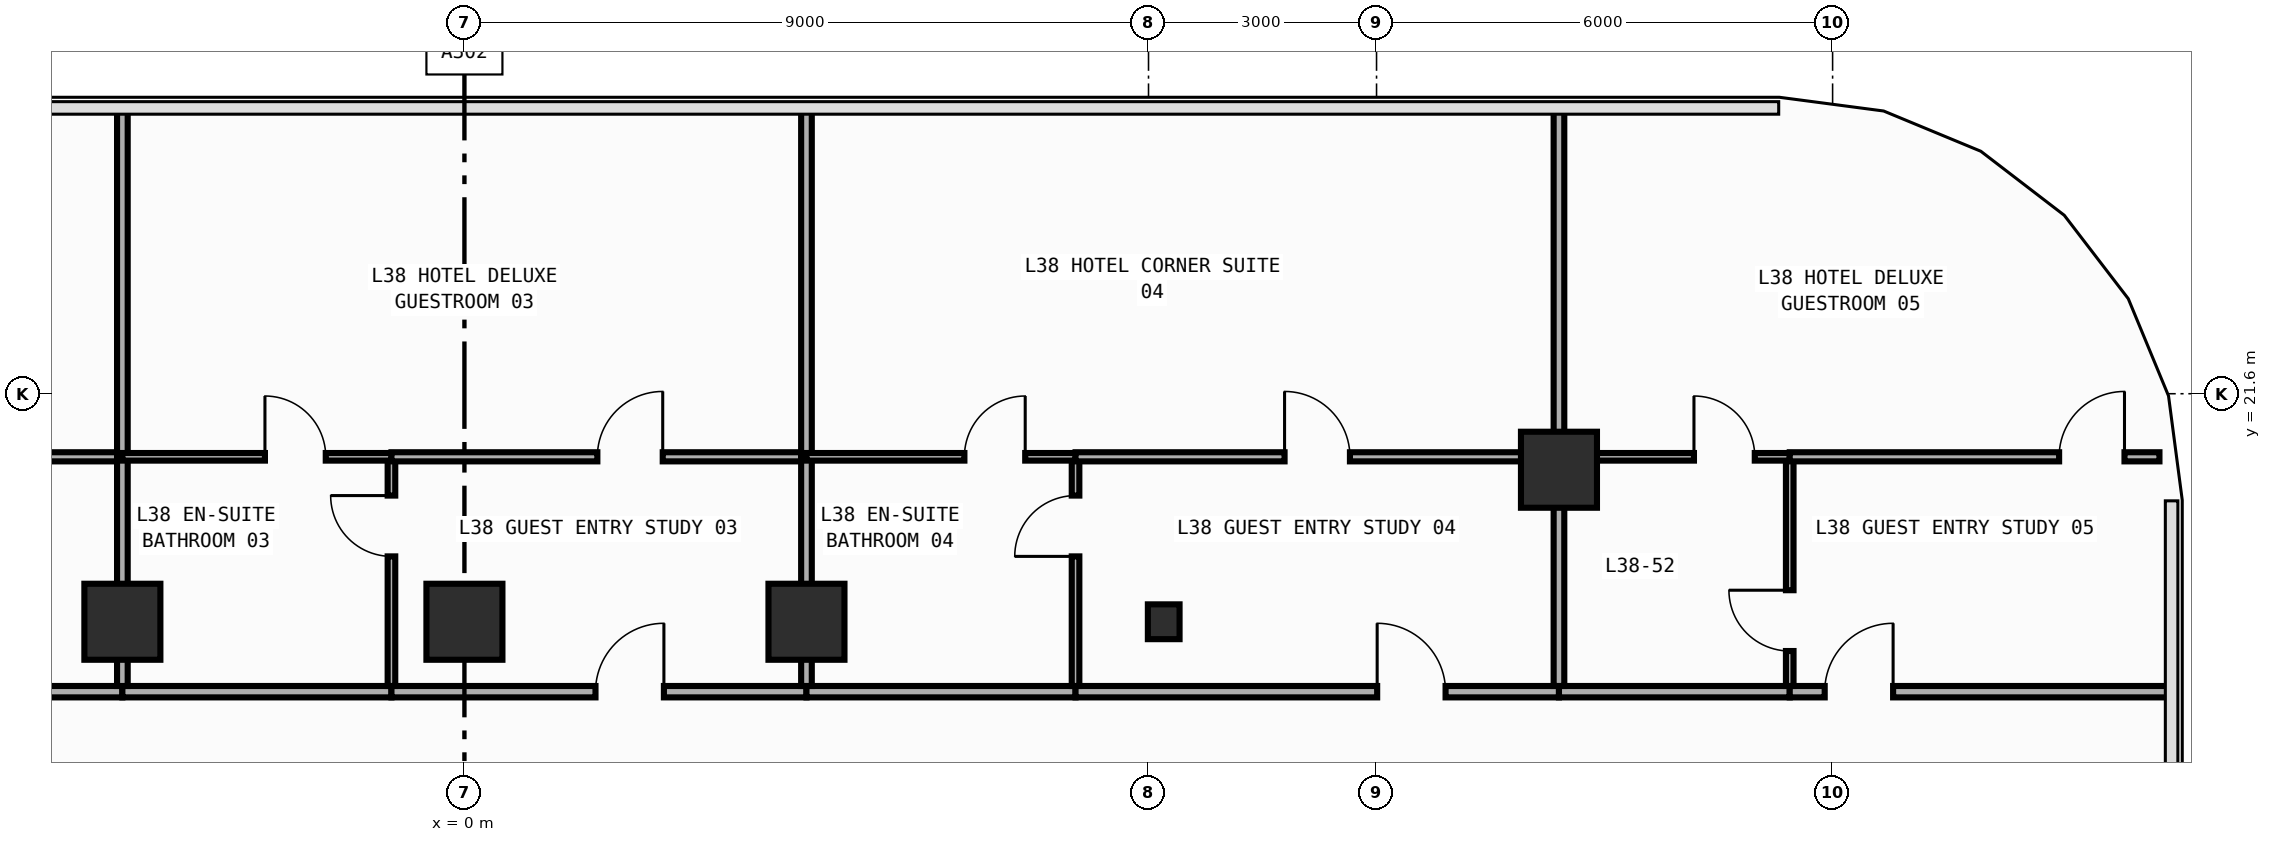
"""IFC4 building model, lengths in metres.
Left out: names, types, materials, properties, quantities, classifications, styles, units other than length and angle.
Written with IfcOpenShell. Run it as: python <this file> out.ifc"""

import sys

from ifc_helpers import new_model, si_unit, direction, frame, frame_2d, origin, origin_2d, place, context, subcontext, project, spatial, rectangle, i_section, extrude, element, fill, save


model = new_model("IFC4")
c1 = context("Model", 3, precision=1e-05, world=origin(), true_north=direction((0.0, 1.0)))
c2 = subcontext(c1, "Body", "Model", "MODEL_VIEW")
j1 = project(units=[si_unit("LENGTHUNIT", "METRE"), si_unit("PLANEANGLEUNIT", "RADIAN")], contexts=[c1])
p1 = place(None, origin())
s1 = spatial("IfcSite", under=j1, at=p1, CompositionType="ELEMENT")
p2 = place(p1, origin())
s2 = spatial("IfcBuilding", under=s1, at=p2, CompositionType="ELEMENT")
p3 = place(p2, frame((0.0, 0.0, 168.8)))
s3 = spatial("IfcBuildingStorey", under=s2, at=p3, CompositionType="ELEMENT", Elevation=168.8)
p4 = place(p3, frame((9.2, 18.6, 0.0), z_axis=(0.0, 0.0, 1.0), x_axis=(1.0, 0.0, 0.0)))
e1 = element("IfcColumn", 1, at=p4, inside=s3, PredefinedType="COLUMN", context=c2, shape_type="SweptSolid", body=[
    extrude(i_section(OverallWidth=0.417, OverallDepth=0.458, WebThickness=0.03, FlangeThickness=0.05, FilletRadius=0.022, at=origin_2d()), origin(), (0.0, 0.0, 1.0), 3.8),
])
for number, where, z_axis, x_axis in (
    (2, (-4.5, 18.6, 0.0), (0.0, 0.0, 1.0), (1.0, 0.0, 0.0)),
    (3, (0.0, 18.6, 0.0), (0.0, 0.0, 1.0), (1.0, 0.0, 0.0)),
    (4, (4.5, 18.6, 0.0), (0.0, 0.0, 1.0), (1.0, 0.0, 0.0)),
    (5, (14.4, 20.6, 0.0), (0.0, 0.0, 1.0), (1.0, 0.0, 0.0)),
):
    element("IfcColumn", number, at=place(p3, frame(where, z_axis=z_axis, x_axis=x_axis)), inside=s3, PredefinedType="COLUMN", context=c2, shape_type="SweptSolid", body=[
        extrude(rectangle(XDim=1.0, YDim=1.0, at=origin_2d()), origin(), (0.0, 0.0, 1.0), 3.8),
    ])
p5 = place(p3, frame((-10.86, 17.68, 0.0), z_axis=(0.0, 0.0, 1.0), x_axis=(1.0, 0.0, 0.0)))
e6 = element("IfcWall", 6, at=p5, inside=s3, PredefinedType="PARTITIONING", context=c2, shape_type="SweptSolid", body=[
    extrude(rectangle(XDim=6.36, YDim=0.15, at=frame_2d((3.18, 0.0))), origin(), (0.0, 0.0, 1.0), 3.54),
])
p6 = place(p5, frame((3.349, 0.0, 0.0)))
e7 = element("IfcOpeningElement", 7, at=p6, cuts=e6, PredefinedType="OPENING", context=c2, shape_type="SweptSolid", body=[
    extrude(rectangle(XDim=0.9, YDim=2.15, at=frame_2d((0.45, 1.075))), frame((0.0, 0.085, 0.0), z_axis=(0.0, -1.0, 0.0), x_axis=(1.0, 0.0, 0.0)), (0.0, 0.0, 1.0), 0.17),
])
p7 = place(p3, frame((-4.5, 17.68, 0.0), z_axis=(0.0, 0.0, 1.0), x_axis=(1.0, 0.0, 0.0)))
e8 = element("IfcWall", 8, at=p7, inside=s3, PredefinedType="PARTITIONING", context=c2, shape_type="SweptSolid", body=[
    extrude(rectangle(XDim=3.54, YDim=0.15, at=frame_2d((1.77, 0.0))), origin(), (0.0, 0.0, 1.0), 3.54),
])
p8 = place(p3, frame((-0.96, 17.68, 0.0), z_axis=(0.0, 0.0, 1.0), x_axis=(1.0, 0.0, 0.0)))
e9 = element("IfcWall", 9, at=p8, inside=s3, PredefinedType="PARTITIONING", context=c2, shape_type="SweptSolid", body=[
    extrude(rectangle(XDim=5.46, YDim=0.15, at=frame_2d((2.73, 0.0))), origin(), (0.0, 0.0, 1.0), 3.54),
])
p9 = place(p8, frame((2.684, 0.0, 0.0)))
e10 = element("IfcOpeningElement", 10, at=p9, cuts=e9, PredefinedType="OPENING", context=c2, shape_type="SweptSolid", body=[
    extrude(rectangle(XDim=0.9, YDim=2.15, at=frame_2d((0.45, 1.075))), frame((0.0, 0.085, 0.0), z_axis=(0.0, -1.0, 0.0), x_axis=(1.0, 0.0, 0.0)), (0.0, 0.0, 1.0), 0.17),
])
p10 = place(p3, frame((4.5, 17.68, 0.0), z_axis=(0.0, 0.0, 1.0), x_axis=(1.0, 0.0, 0.0)))
e11 = element("IfcWall", 11, at=p10, inside=s3, PredefinedType="PARTITIONING", context=c2, shape_type="SweptSolid", body=[
    extrude(rectangle(XDim=3.54, YDim=0.15, at=frame_2d((1.77, 0.0))), origin(), (0.0, 0.0, 1.0), 3.54),
])
p11 = place(p3, frame((8.04, 17.68, 0.0), z_axis=(0.0, 0.0, 1.0), x_axis=(1.0, 0.0, 0.0)))
e12 = element("IfcWall", 12, at=p11, inside=s3, PredefinedType="PARTITIONING", context=c2, shape_type="SweptSolid", body=[
    extrude(rectangle(XDim=6.36, YDim=0.15, at=frame_2d((3.18, 0.0))), origin(), (0.0, 0.0, 1.0), 3.54),
])
p12 = place(p11, frame((3.968, 0.0, 0.0)))
e13 = element("IfcOpeningElement", 13, at=p12, cuts=e12, PredefinedType="OPENING", context=c2, shape_type="SweptSolid", body=[
    extrude(rectangle(XDim=0.9, YDim=2.15, at=frame_2d((0.45, 1.075))), frame((0.0, 0.085, 0.0), z_axis=(0.0, -1.0, 0.0), x_axis=(1.0, 0.0, 0.0)), (0.0, 0.0, 1.0), 0.17),
])
p13 = place(p3, frame((14.4, 17.68, 0.0), z_axis=(0.0, 0.0, 1.0), x_axis=(1.0, 0.0, 0.0)))
e14 = element("IfcWall", 14, at=p13, inside=s3, PredefinedType="PARTITIONING", context=c2, shape_type="SweptSolid", body=[
    extrude(rectangle(XDim=3.036, YDim=0.15, at=frame_2d((1.518, 0.0))), origin(), (0.0, 0.0, 1.0), 3.54),
])
p14 = place(p3, frame((17.436, 17.68, 0.0), z_axis=(0.0, 0.0, 1.0), x_axis=(1.0, 0.0, 0.0)))
e15 = element("IfcWall", 15, at=p14, inside=s3, PredefinedType="PARTITIONING", context=c2, shape_type="SweptSolid", body=[
    extrude(rectangle(XDim=5.019, YDim=0.15, at=frame_2d((2.51, 0.0))), origin(), (0.0, 0.0, 1.0), 3.54),
])
p15 = place(p14, frame((0.46, 0.0, 0.0)))
e16 = element("IfcOpeningElement", 16, at=p15, cuts=e15, PredefinedType="OPENING", context=c2, shape_type="SweptSolid", body=[
    extrude(rectangle(XDim=0.9, YDim=2.15, at=frame_2d((0.45, 1.075))), frame((0.0, 0.085, 0.0), z_axis=(0.0, -1.0, 0.0), x_axis=(1.0, 0.0, 0.0)), (0.0, 0.0, 1.0), 0.17),
])
p16 = place(p3, frame((-10.86, 20.77, 0.0), z_axis=(0.0, 0.0, 1.0), x_axis=(1.0, 0.0, 0.0)))
e17 = element("IfcWall", 17, at=p16, inside=s3, PredefinedType="PARTITIONING", context=c2, shape_type="SweptSolid", body=[
    extrude(rectangle(XDim=6.36, YDim=0.12, at=frame_2d((3.18, 0.0))), origin(), (0.0, 0.0, 1.0), 3.54),
])
p17 = place(p16, frame((3.375, 0.0, 0.0)))
e18 = element("IfcOpeningElement", 18, at=p17, cuts=e17, PredefinedType="OPENING", context=c2, shape_type="SweptSolid", body=[
    extrude(rectangle(XDim=0.86, YDim=2.15, at=frame_2d((0.43, 1.075))), frame((0.0, 0.07, 0.0), z_axis=(0.0, -1.0, 0.0), x_axis=(1.0, 0.0, 0.0)), (0.0, 0.0, 1.0), 0.14),
])
p18 = place(p3, frame((-4.5, 17.755, 0.0), z_axis=(0.0, 0.0, 1.0), x_axis=(0.0, 1.0, 0.0)))
e19 = element("IfcWall", 19, at=p18, inside=s3, PredefinedType="PARTITIONING", context=c2, shape_type="SweptSolid", body=[
    extrude(rectangle(XDim=3.015, YDim=0.14, at=frame_2d((1.508, 0.0))), origin(), (0.0, 0.0, 1.0), 3.54),
])
p19 = place(p3, frame((-4.5, 20.77, 0.0), z_axis=(0.0, 0.0, 1.0), x_axis=(0.0, 1.0, 0.0)))
e20 = element("IfcWall", 20, at=p19, inside=s3, PredefinedType="PARTITIONING", context=c2, shape_type="SweptSolid", body=[
    extrude(rectangle(XDim=4.585, YDim=0.14, at=frame_2d((2.292, 0.0))), origin(), (0.0, 0.0, 1.0), 3.54),
])
p20 = place(p3, frame((-0.96, 17.755, 0.0), z_axis=(0.0, 0.0, 1.0), x_axis=(0.0, 1.0, 0.0)))
e21 = element("IfcWall", 21, at=p20, inside=s3, PredefinedType="PARTITIONING", context=c2, shape_type="SweptSolid", body=[
    extrude(rectangle(XDim=2.965, YDim=0.1, at=frame_2d((1.482, 0.0))), origin(), (0.0, 0.0, 1.0), 3.54),
])
p21 = place(p20, frame((1.705, 0.0, 0.0)))
e22 = element("IfcOpeningElement", 22, at=p21, cuts=e21, PredefinedType="OPENING", context=c2, shape_type="SweptSolid", body=[
    extrude(rectangle(XDim=0.8, YDim=2.1, at=frame_2d((0.4, 1.05))), frame((0.0, 0.06, 0.0), z_axis=(0.0, -1.0, 0.0), x_axis=(1.0, 0.0, 0.0)), (0.0, 0.0, 1.0), 0.12),
])
p22 = place(p3, frame((-4.5, 20.77, 0.0), z_axis=(0.0, 0.0, 1.0), x_axis=(1.0, 0.0, 0.0)))
e23 = element("IfcWall", 23, at=p22, inside=s3, PredefinedType="PARTITIONING", context=c2, shape_type="SweptSolid", body=[
    extrude(rectangle(XDim=3.54, YDim=0.1, at=frame_2d((1.77, 0.0))), origin(), (0.0, 0.0, 1.0), 3.54),
])
p23 = place(p22, frame((1.875, 0.0, 0.0)))
e24 = element("IfcOpeningElement", 24, at=p23, cuts=e23, PredefinedType="OPENING", context=c2, shape_type="SweptSolid", body=[
    extrude(rectangle(XDim=0.8, YDim=2.1, at=frame_2d((0.4, 1.05))), frame((0.0, 0.06, 0.0), z_axis=(0.0, -1.0, 0.0), x_axis=(1.0, 0.0, 0.0)), (0.0, 0.0, 1.0), 0.12),
])
p24 = place(p3, frame((-0.96, 20.77, 0.0), z_axis=(0.0, 0.0, 1.0), x_axis=(1.0, 0.0, 0.0)))
e25 = element("IfcWall", 25, at=p24, inside=s3, PredefinedType="PARTITIONING", context=c2, shape_type="SweptSolid", body=[
    extrude(rectangle(XDim=5.46, YDim=0.12, at=frame_2d((2.73, 0.0))), origin(), (0.0, 0.0, 1.0), 3.54),
])
p25 = place(p24, frame((2.709, 0.0, 0.0)))
e26 = element("IfcOpeningElement", 26, at=p25, cuts=e25, PredefinedType="OPENING", context=c2, shape_type="SweptSolid", body=[
    extrude(rectangle(XDim=0.86, YDim=2.15, at=frame_2d((0.43, 1.075))), frame((0.0, 0.07, 0.0), z_axis=(0.0, -1.0, 0.0), x_axis=(1.0, 0.0, 0.0)), (0.0, 0.0, 1.0), 0.14),
])
p26 = place(p3, frame((4.5, 17.755, 0.0), z_axis=(0.0, 0.0, 1.0), x_axis=(0.0, 1.0, 0.0)))
e27 = element("IfcWall", 27, at=p26, inside=s3, PredefinedType="PARTITIONING", context=c2, shape_type="SweptSolid", body=[
    extrude(rectangle(XDim=3.015, YDim=0.14, at=frame_2d((1.508, 0.0))), origin(), (0.0, 0.0, 1.0), 3.54),
])
p27 = place(p3, frame((4.5, 20.77, 0.0), z_axis=(0.0, 0.0, 1.0), x_axis=(0.0, 1.0, 0.0)))
e28 = element("IfcWall", 28, at=p27, inside=s3, PredefinedType="PARTITIONING", context=c2, shape_type="SweptSolid", body=[
    extrude(rectangle(XDim=4.585, YDim=0.14, at=frame_2d((2.292, 0.0))), origin(), (0.0, 0.0, 1.0), 3.54),
])
p28 = place(p3, frame((8.04, 17.755, 0.0), z_axis=(0.0, 0.0, 1.0), x_axis=(0.0, 1.0, 0.0)))
e29 = element("IfcWall", 29, at=p28, inside=s3, PredefinedType="PARTITIONING", context=c2, shape_type="SweptSolid", body=[
    extrude(rectangle(XDim=2.965, YDim=0.1, at=frame_2d((1.482, 0.0))), origin(), (0.0, 0.0, 1.0), 3.54),
])
p29 = place(p28, frame((1.705, 0.0, 0.0)))
e30 = element("IfcOpeningElement", 30, at=p29, cuts=e29, PredefinedType="OPENING", context=c2, shape_type="SweptSolid", body=[
    extrude(rectangle(XDim=0.8, YDim=2.1, at=frame_2d((0.4, 1.05))), frame((0.0, 0.06, 0.0), z_axis=(0.0, -1.0, 0.0), x_axis=(1.0, 0.0, 0.0)), (0.0, 0.0, 1.0), 0.12),
])
p30 = place(p3, frame((4.5, 20.77, 0.0), z_axis=(0.0, 0.0, 1.0), x_axis=(1.0, 0.0, 0.0)))
e31 = element("IfcWall", 31, at=p30, inside=s3, PredefinedType="PARTITIONING", context=c2, shape_type="SweptSolid", body=[
    extrude(rectangle(XDim=3.54, YDim=0.1, at=frame_2d((1.77, 0.0))), origin(), (0.0, 0.0, 1.0), 3.54),
])
p31 = place(p30, frame((2.078, 0.0, 0.0)))
e32 = element("IfcOpeningElement", 32, at=p31, cuts=e31, PredefinedType="OPENING", context=c2, shape_type="SweptSolid", body=[
    extrude(rectangle(XDim=0.8, YDim=2.1, at=frame_2d((0.4, 1.05))), frame((0.0, 0.06, 0.0), z_axis=(0.0, -1.0, 0.0), x_axis=(1.0, 0.0, 0.0)), (0.0, 0.0, 1.0), 0.12),
])
p32 = place(p3, frame((8.04, 20.77, 0.0), z_axis=(0.0, 0.0, 1.0), x_axis=(1.0, 0.0, 0.0)))
e33 = element("IfcWall", 33, at=p32, inside=s3, PredefinedType="PARTITIONING", context=c2, shape_type="SweptSolid", body=[
    extrude(rectangle(XDim=6.36, YDim=0.12, at=frame_2d((3.18, 0.0))), origin(), (0.0, 0.0, 1.0), 3.54),
])
p33 = place(p32, frame((2.75, 0.0, 0.0)))
e34 = element("IfcOpeningElement", 34, at=p33, cuts=e33, PredefinedType="OPENING", context=c2, shape_type="SweptSolid", body=[
    extrude(rectangle(XDim=0.86, YDim=2.15, at=frame_2d((0.43, 1.075))), frame((0.0, 0.07, 0.0), z_axis=(0.0, -1.0, 0.0), x_axis=(1.0, 0.0, 0.0)), (0.0, 0.0, 1.0), 0.14),
])
p34 = place(p3, frame((14.4, 17.755, 0.0), z_axis=(0.0, 0.0, 1.0), x_axis=(0.0, 1.0, 0.0)))
e35 = element("IfcWall", 35, at=p34, inside=s3, PredefinedType="PARTITIONING", context=c2, shape_type="SweptSolid", body=[
    extrude(rectangle(XDim=3.015, YDim=0.14, at=frame_2d((1.508, 0.0))), origin(), (0.0, 0.0, 1.0), 2.952),
])
p35 = place(p3, frame((14.4, 20.77, 0.0), z_axis=(0.0, 0.0, 1.0), x_axis=(0.0, 1.0, 0.0)))
e36 = element("IfcWall", 36, at=p35, inside=s3, PredefinedType="PARTITIONING", context=c2, shape_type="SweptSolid", body=[
    extrude(rectangle(XDim=4.585, YDim=0.14, at=frame_2d((2.292, 0.0))), origin(), (0.0, 0.0, 1.0), 2.952),
])
p36 = place(p3, frame((17.436, 17.755, 0.0), z_axis=(0.0, 0.0, 1.0), x_axis=(0.0, 1.0, 0.0)))
e37 = element("IfcWall", 37, at=p36, inside=s3, PredefinedType="PARTITIONING", context=c2, shape_type="SweptSolid", body=[
    extrude(rectangle(XDim=2.965, YDim=0.1, at=frame_2d((1.482, 0.0))), origin(), (0.0, 0.0, 1.0), 3.54),
])
p37 = place(p36, frame((0.46, 0.0, 0.0)))
e38 = element("IfcOpeningElement", 38, at=p37, cuts=e37, PredefinedType="OPENING", context=c2, shape_type="SweptSolid", body=[
    extrude(rectangle(XDim=0.8, YDim=2.1, at=frame_2d((0.4, 1.05))), frame((0.0, 0.06, 0.0), z_axis=(0.0, -1.0, 0.0), x_axis=(1.0, 0.0, 0.0)), (0.0, 0.0, 1.0), 0.12),
])
p38 = place(p3, frame((14.4, 20.77, 0.0), z_axis=(0.0, 0.0, 1.0), x_axis=(1.0, 0.0, 0.0)))
e39 = element("IfcWall", 39, at=p38, inside=s3, PredefinedType="PARTITIONING", context=c2, shape_type="SweptSolid", body=[
    extrude(rectangle(XDim=3.036, YDim=0.1, at=frame_2d((1.518, 0.0))), origin(), (0.0, 0.0, 1.0), 3.54),
])
p39 = place(p38, frame((1.776, 0.0, 0.0)))
e40 = element("IfcOpeningElement", 40, at=p39, cuts=e39, PredefinedType="OPENING", context=c2, shape_type="SweptSolid", body=[
    extrude(rectangle(XDim=0.8, YDim=2.1, at=frame_2d((0.4, 1.05))), frame((0.0, 0.06, 0.0), z_axis=(0.0, -1.0, 0.0), x_axis=(1.0, 0.0, 0.0)), (0.0, 0.0, 1.0), 0.12),
])
p40 = place(p3, frame((17.436, 20.77, 0.0), z_axis=(0.0, 0.0, 1.0), x_axis=(1.0, 0.0, 0.0)))
e41 = element("IfcWall", 41, at=p40, inside=s3, PredefinedType="PARTITIONING", context=c2, shape_type="SweptSolid", body=[
    extrude(rectangle(XDim=4.864, YDim=0.12, at=frame_2d((2.432, 0.0))), origin(), (0.0, 0.0, 1.0), 3.54),
])
p41 = place(p40, frame((3.544, 0.0, 0.0)))
e42 = element("IfcOpeningElement", 42, at=p41, cuts=e41, PredefinedType="OPENING", context=c2, shape_type="SweptSolid", body=[
    extrude(rectangle(XDim=0.86, YDim=2.15, at=frame_2d((0.43, 1.075))), frame((0.0, 0.07, 0.0), z_axis=(0.0, -1.0, 0.0), x_axis=(1.0, 0.0, 0.0)), (0.0, 0.0, 1.0), 0.14),
])
p42 = place(p9, origin())
e43 = element("IfcDoor", 43, at=p42, inside=s3, OperationType="SINGLE_SWING_RIGHT", PredefinedType="DOOR", context=c2, shape_type="SweptSolid", body=[
    extrude(rectangle(XDim=0.9, YDim=2.15, at=frame_2d((0.45, 1.075))), frame((0.0, 0.025, 0.0), z_axis=(0.0, -1.0, 0.0), x_axis=(1.0, 0.0, 0.0)), (0.0, 0.0, 1.0), 0.05),
])
fill(e10, e43)
p43 = place(p12, origin())
e44 = element("IfcDoor", 44, at=p43, inside=s3, OperationType="SINGLE_SWING_LEFT", PredefinedType="DOOR", context=c2, shape_type="SweptSolid", body=[
    extrude(rectangle(XDim=0.9, YDim=2.15, at=frame_2d((0.45, 1.075))), frame((0.0, 0.025, 0.0), z_axis=(0.0, -1.0, 0.0), x_axis=(1.0, 0.0, 0.0)), (0.0, 0.0, 1.0), 0.05),
])
fill(e13, e44)
p44 = place(p15, origin())
e45 = element("IfcDoor", 45, at=p44, inside=s3, OperationType="SINGLE_SWING_RIGHT", PredefinedType="DOOR", context=c2, shape_type="SweptSolid", body=[
    extrude(rectangle(XDim=0.9, YDim=2.15, at=frame_2d((0.45, 1.075))), frame((0.0, 0.025, 0.0), z_axis=(0.0, -1.0, 0.0), x_axis=(1.0, 0.0, 0.0)), (0.0, 0.0, 1.0), 0.05),
])
fill(e16, e45)
p45 = place(p21, origin())
e46 = element("IfcDoor", 46, at=p45, inside=s3, OperationType="SINGLE_SWING_RIGHT", PredefinedType="DOOR", context=c2, shape_type="SweptSolid", body=[
    extrude(rectangle(XDim=0.8, YDim=2.1, at=frame_2d((0.4, 1.05))), frame((0.0, 0.025, 0.0), z_axis=(0.0, -1.0, 0.0), x_axis=(1.0, 0.0, 0.0)), (0.0, 0.0, 1.0), 0.05),
])
fill(e22, e46)
p46 = place(p23, origin())
e47 = element("IfcDoor", 47, at=p46, inside=s3, OperationType="SINGLE_SWING_LEFT", PredefinedType="DOOR", context=c2, shape_type="SweptSolid", body=[
    extrude(rectangle(XDim=0.8, YDim=2.1, at=frame_2d((0.4, 1.05))), frame((0.0, 0.025, 0.0), z_axis=(0.0, -1.0, 0.0), x_axis=(1.0, 0.0, 0.0)), (0.0, 0.0, 1.0), 0.05),
])
fill(e24, e47)
p47 = place(p25, origin())
e48 = element("IfcDoor", 48, at=p47, inside=s3, OperationType="SINGLE_SWING_RIGHT", PredefinedType="DOOR", context=c2, shape_type="SweptSolid", body=[
    extrude(rectangle(XDim=0.86, YDim=2.15, at=frame_2d((0.43, 1.075))), frame((0.0, 0.025, 0.0), z_axis=(0.0, -1.0, 0.0), x_axis=(1.0, 0.0, 0.0)), (0.0, 0.0, 1.0), 0.05),
])
fill(e26, e48)
p48 = place(p29, origin())
e49 = element("IfcDoor", 49, at=p48, inside=s3, OperationType="SINGLE_SWING_LEFT", PredefinedType="DOOR", context=c2, shape_type="SweptSolid", body=[
    extrude(rectangle(XDim=0.8, YDim=2.1, at=frame_2d((0.4, 1.05))), frame((0.0, 0.025, 0.0), z_axis=(0.0, -1.0, 0.0), x_axis=(1.0, 0.0, 0.0)), (0.0, 0.0, 1.0), 0.05),
])
fill(e30, e49)
p49 = place(p31, origin())
e50 = element("IfcDoor", 50, at=p49, inside=s3, OperationType="SINGLE_SWING_RIGHT", PredefinedType="DOOR", context=c2, shape_type="SweptSolid", body=[
    extrude(rectangle(XDim=0.8, YDim=2.1, at=frame_2d((0.4, 1.05))), frame((0.0, 0.025, 0.0), z_axis=(0.0, -1.0, 0.0), x_axis=(1.0, 0.0, 0.0)), (0.0, 0.0, 1.0), 0.05),
])
fill(e32, e50)
p50 = place(p33, origin())
e51 = element("IfcDoor", 51, at=p50, inside=s3, OperationType="SINGLE_SWING_LEFT", PredefinedType="DOOR", context=c2, shape_type="SweptSolid", body=[
    extrude(rectangle(XDim=0.86, YDim=2.15, at=frame_2d((0.43, 1.075))), frame((0.0, 0.025, 0.0), z_axis=(0.0, -1.0, 0.0), x_axis=(1.0, 0.0, 0.0)), (0.0, 0.0, 1.0), 0.05),
])
fill(e34, e51)
p51 = place(p37, origin())
e52 = element("IfcDoor", 52, at=p51, inside=s3, OperationType="SINGLE_SWING_RIGHT", PredefinedType="DOOR", context=c2, shape_type="SweptSolid", body=[
    extrude(rectangle(XDim=0.8, YDim=2.1, at=frame_2d((0.4, 1.05))), frame((0.0, 0.025, 0.0), z_axis=(0.0, -1.0, 0.0), x_axis=(1.0, 0.0, 0.0)), (0.0, 0.0, 1.0), 0.05),
])
fill(e38, e52)
p52 = place(p39, origin())
e53 = element("IfcDoor", 53, at=p52, inside=s3, OperationType="SINGLE_SWING_LEFT", PredefinedType="DOOR", context=c2, shape_type="SweptSolid", body=[
    extrude(rectangle(XDim=0.8, YDim=2.1, at=frame_2d((0.4, 1.05))), frame((0.0, 0.025, 0.0), z_axis=(0.0, -1.0, 0.0), x_axis=(1.0, 0.0, 0.0)), (0.0, 0.0, 1.0), 0.05),
])
fill(e40, e53)
p53 = place(p41, origin())
e54 = element("IfcDoor", 54, at=p53, inside=s3, OperationType="SINGLE_SWING_RIGHT", PredefinedType="DOOR", context=c2, shape_type="SweptSolid", body=[
    extrude(rectangle(XDim=0.86, YDim=2.15, at=frame_2d((0.43, 1.075))), frame((0.0, 0.025, 0.0), z_axis=(0.0, -1.0, 0.0), x_axis=(1.0, 0.0, 0.0)), (0.0, 0.0, 1.0), 0.05),
])
fill(e42, e54)
save(model, sys.argv[1])
